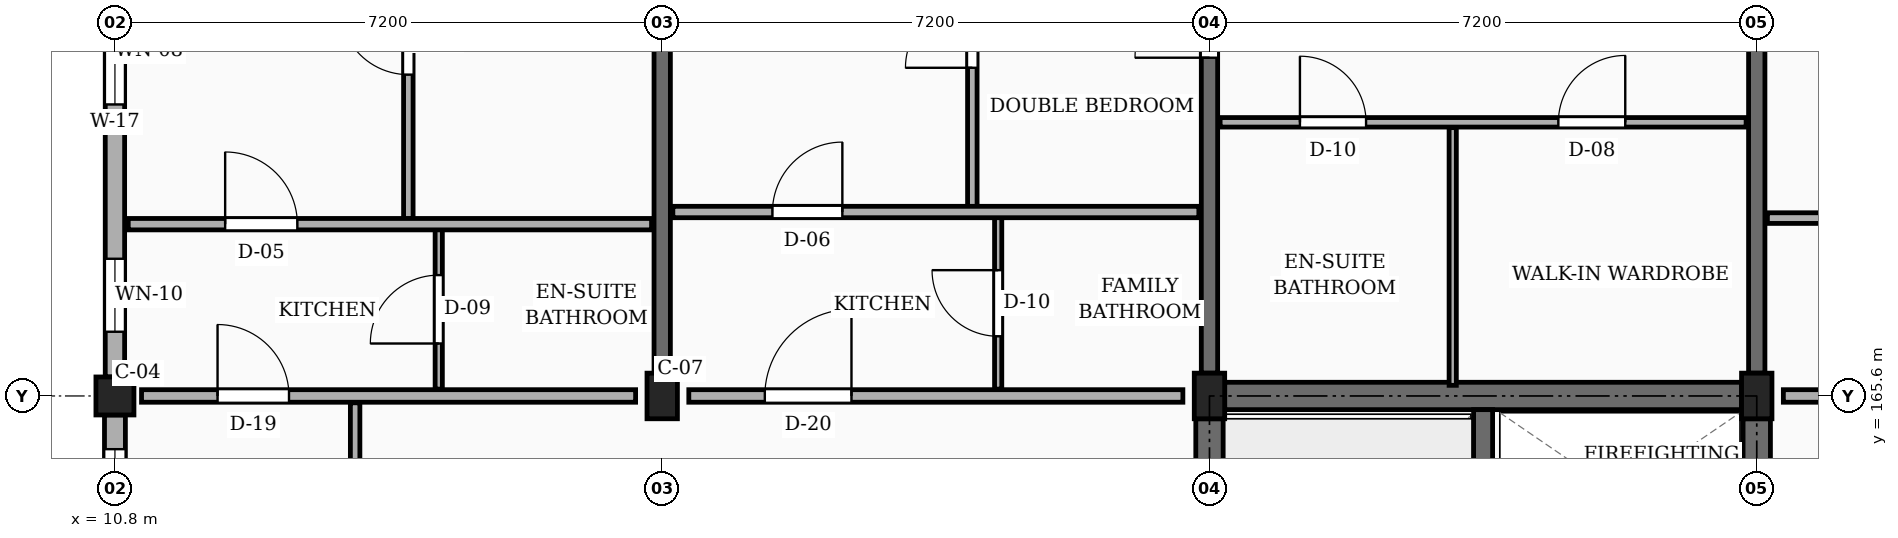
"""IFC4 building model, lengths in metres.
Left out: names, types, materials, properties, quantities, classifications, styles, units other than length and angle.
Written with IfcOpenShell. Run it as: python <this file> out.ifc"""

import sys

from ifc_helpers import new_model, si_unit, direction, frame, frame_2d, origin, origin_2d, place, context, subcontext, project, spatial, rectangle, extrude, element, fill, save


model = new_model("IFC4")
c1 = context("Model", 3, precision=1e-05, world=origin(), true_north=direction((0.0, 1.0)))
c2 = subcontext(c1, "Body", "Model", "MODEL_VIEW")
j1 = project(units=[si_unit("LENGTHUNIT", "METRE"), si_unit("PLANEANGLEUNIT", "RADIAN")], contexts=[c1])
p1 = place(None, origin())
s1 = spatial("IfcSite", under=j1, at=p1, CompositionType="ELEMENT")
p2 = place(p1, origin())
s2 = spatial("IfcBuilding", under=s1, at=p2, CompositionType="ELEMENT")
p3 = place(p2, frame((0.0, 0.0, 29.7)))
s3 = spatial("IfcBuildingStorey", under=s2, at=p3, CompositionType="ELEMENT", Elevation=29.7)
p4 = place(p3, frame((10.8, 165.6, 0.0), z_axis=(0.0, 0.0, 1.0), x_axis=(1.0, 0.0, 0.0)))
e1 = element("IfcColumn", 1, at=p4, inside=s3, PredefinedType="COLUMN", context=c2, shape_type="SweptSolid", body=[
    extrude(rectangle(XDim=0.5, YDim=0.5, at=origin_2d()), origin(), (0.0, 0.0, 1.0), 3.15),
])
for number, where, z_axis, x_axis in (
    (2, (18.0, 165.6, 0.0), (0.0, 0.0, 1.0), (1.0, 0.0, 0.0)),
    (3, (25.2, 165.6, 0.0), (0.0, 0.0, 1.0), (1.0, 0.0, 0.0)),
    (4, (32.4, 165.6, 0.0), (0.0, 0.0, 1.0), (1.0, 0.0, 0.0)),
):
    element("IfcColumn", number, at=place(p3, frame(where, z_axis=z_axis, x_axis=x_axis)), inside=s3, PredefinedType="COLUMN", context=c2, shape_type="SweptSolid", body=[
        extrude(rectangle(XDim=0.4, YDim=0.6, at=origin_2d()), origin(), (0.0, 0.0, 1.0), 3.15),
    ])
p5 = place(p3, frame((18.0, 165.9, 0.0), z_axis=(0.0, 0.0, 1.0), x_axis=(0.0, 1.0, 0.0)))
e5 = element("IfcWall", 5, at=p5, inside=s3, PredefinedType="SOLIDWALL", context=c2, shape_type="SweptSolid", body=[
    extrude(rectangle(XDim=6.65, YDim=0.215, at=frame_2d((3.325, 0.0))), origin(), (0.0, 0.0, 1.0), 2.185),
])
p6 = place(p3, frame((25.2, 165.9, 0.0), z_axis=(0.0, 0.0, 1.0), x_axis=(0.0, 1.0, 0.0)))
e6 = element("IfcWall", 6, at=p6, inside=s3, PredefinedType="SOLIDWALL", context=c2, shape_type="SweptSolid", body=[
    extrude(rectangle(XDim=6.65, YDim=0.215, at=frame_2d((3.325, 0.0))), origin(), (0.0, 0.0, 1.0), 2.185),
])
p7 = place(p6, frame((4.15, 0.0, 0.0)))
e7 = element("IfcOpeningElement", 7, at=p7, cuts=e6, PredefinedType="OPENING", context=c2, shape_type="SweptSolid", body=[
    extrude(rectangle(XDim=0.98, YDim=2.12, at=frame_2d((0.49, 1.06))), frame((0.0, 0.118, 0.0), z_axis=(0.0, -1.0, 0.0), x_axis=(1.0, 0.0, 0.0)), (0.0, 0.0, 1.0), 0.235),
])
p8 = place(p3, frame((32.4, 165.9, 0.0), z_axis=(0.0, 0.0, 1.0), x_axis=(0.0, 1.0, 0.0)))
e8 = element("IfcWall", 8, at=p8, inside=s3, PredefinedType="SOLIDWALL", context=c2, shape_type="SweptSolid", body=[
    extrude(rectangle(XDim=6.65, YDim=0.215, at=frame_2d((3.325, 0.0))), origin(), (0.0, 0.0, 1.0), 2.185),
])
p9 = place(p3, frame((10.8, 172.55, 0.0), z_axis=(0.0, 0.0, 1.0), x_axis=(0.0, -1.0, 0.0)))
e9 = element("IfcWall", 9, at=p9, inside=s3, PredefinedType="SOLIDWALL", context=c2, shape_type="SweptSolid", body=[
    extrude(rectangle(XDim=6.7, YDim=0.255, at=frame_2d((3.35, 0.0))), origin(), (0.0, 0.0, 1.0), 2.455),
])
p10 = place(p9, frame((1.715, 0.0, 0.78)))
e10 = element("IfcOpeningElement", 10, at=p10, cuts=e9, PredefinedType="OPENING", context=c2, shape_type="SweptSolid", body=[
    extrude(rectangle(XDim=1.4, YDim=1.15, at=frame_2d((0.7, 0.575))), frame((0.0, 0.137, 0.0), z_axis=(0.0, -1.0, 0.0), x_axis=(1.0, 0.0, 0.0)), (0.0, 0.0, 1.0), 0.275),
])
p11 = place(p9, frame((5.145, 0.0, 0.78)))
e11 = element("IfcOpeningElement", 11, at=p11, cuts=e9, PredefinedType="OPENING", context=c2, shape_type="SweptSolid", body=[
    extrude(rectangle(XDim=0.96, YDim=1.26, at=frame_2d((0.48, 0.63))), frame((0.0, 0.137, 0.0), z_axis=(0.0, -1.0, 0.0), x_axis=(1.0, 0.0, 0.0)), (0.0, 0.0, 1.0), 0.275),
])
p12 = place(p3, frame((10.8, 165.35, 0.0), z_axis=(0.0, 0.0, 1.0), x_axis=(0.0, -1.0, 0.0)))
e12 = element("IfcWall", 12, at=p12, inside=s3, PredefinedType="SOLIDWALL", context=c2, shape_type="SweptSolid", body=[
    extrude(rectangle(XDim=6.7, YDim=0.275, at=frame_2d((3.35, 0.0))), origin(), (0.0, 0.0, 1.0), 2.455),
])
p13 = place(p12, frame((0.45, 0.0, 0.78)))
e13 = element("IfcOpeningElement", 13, at=p13, cuts=e12, PredefinedType="OPENING", context=c2, shape_type="SweptSolid", body=[
    extrude(rectangle(XDim=0.96, YDim=1.26, at=frame_2d((0.48, 0.63))), frame((0.0, 0.147, 0.0), z_axis=(0.0, -1.0, 0.0), x_axis=(1.0, 0.0, 0.0)), (0.0, 0.0, 1.0), 0.295),
])
p14 = place(p12, frame((4.65, 0.0, 0.78)))
e14 = element("IfcOpeningElement", 14, at=p14, cuts=e12, PredefinedType="OPENING", context=c2, shape_type="SweptSolid", body=[
    extrude(rectangle(XDim=1.12, YDim=1.26, at=frame_2d((0.56, 0.63))), frame((0.0, 0.147, 0.0), z_axis=(0.0, -1.0, 0.0), x_axis=(1.0, 0.0, 0.0)), (0.0, 0.0, 1.0), 0.295),
])
p15 = place(p3, frame((25.2, 158.7, 0.0), z_axis=(0.0, 0.0, 1.0), x_axis=(0.0, 1.0, 0.0)))
e15 = element("IfcWall", 15, at=p15, inside=s3, PredefinedType="SHEAR", context=c2, shape_type="SweptSolid", body=[
    extrude(rectangle(XDim=6.6, YDim=0.36, at=frame_2d((3.3, 0.0))), origin(), (0.0, 0.0, 1.0), 2.885),
])
p16 = place(p3, frame((25.4, 165.6, 0.0), z_axis=(0.0, 0.0, 1.0), x_axis=(1.0, 0.0, 0.0)))
e16 = element("IfcWall", 16, at=p16, inside=s3, PredefinedType="SHEAR", context=c2, shape_type="SweptSolid", body=[
    extrude(rectangle(XDim=6.8, YDim=0.36, at=frame_2d((3.4, 0.0))), origin(), (0.0, 0.0, 1.0), 2.885),
])
p17 = place(p3, frame((32.4, 158.7, 0.0), z_axis=(0.0, 0.0, 1.0), x_axis=(0.0, 1.0, 0.0)))
e17 = element("IfcWall", 17, at=p17, inside=s3, PredefinedType="SHEAR", context=c2, shape_type="SweptSolid", body=[
    extrude(rectangle(XDim=6.6, YDim=0.36, at=frame_2d((3.3, 0.0))), origin(), (0.0, 0.0, 1.0), 2.885),
])
p18 = place(p3, frame((28.8, 158.58, 0.0), z_axis=(0.0, 0.0, 1.0), x_axis=(0.0, 1.0, 0.0)))
e18 = element("IfcWall", 18, at=p18, inside=s3, PredefinedType="SHEAR", context=c2, shape_type="SweptSolid", body=[
    extrude(rectangle(XDim=6.84, YDim=0.25, at=frame_2d((3.42, 0.0))), origin(), (0.0, 0.0, 1.0), 2.885),
])
p19 = place(p18, frame((0.42, 0.0, 0.0)))
e19 = element("IfcOpeningElement", 19, at=p19, cuts=e18, PredefinedType="OPENING", context=c2, shape_type="SweptSolid", body=[
    extrude(rectangle(XDim=1.05, YDim=2.15, at=frame_2d((0.525, 1.075))), frame((0.0, 0.135, 0.0), z_axis=(0.0, -1.0, 0.0), x_axis=(1.0, 0.0, 0.0)), (0.0, 0.0, 1.0), 0.27),
])
p20 = place(p3, frame((11.15, 165.6, 0.0), z_axis=(0.0, 0.0, 1.0), x_axis=(1.0, 0.0, 0.0)))
e20 = element("IfcWall", 20, at=p20, inside=s3, PredefinedType="PARTITIONING", context=c2, shape_type="SweptSolid", body=[
    extrude(rectangle(XDim=6.5, YDim=0.165, at=frame_2d((3.25, 0.0))), origin(), (0.0, 0.0, 1.0), 2.32),
])
p21 = place(p20, frame((1.0, 0.0, 0.0)))
e21 = element("IfcOpeningElement", 21, at=p21, cuts=e20, PredefinedType="OPENING", context=c2, shape_type="SweptSolid", body=[
    extrude(rectangle(XDim=0.94, YDim=2.12, at=frame_2d((0.47, 1.06))), frame((0.0, 0.093, 0.0), z_axis=(0.0, -1.0, 0.0), x_axis=(1.0, 0.0, 0.0)), (0.0, 0.0, 1.0), 0.185),
])
p22 = place(p3, frame((18.35, 165.6, 0.0), z_axis=(0.0, 0.0, 1.0), x_axis=(1.0, 0.0, 0.0)))
e22 = element("IfcWall", 22, at=p22, inside=s3, PredefinedType="PARTITIONING", context=c2, shape_type="SweptSolid", body=[
    extrude(rectangle(XDim=6.5, YDim=0.165, at=frame_2d((3.25, 0.0))), origin(), (0.0, 0.0, 1.0), 2.32),
])
p23 = place(p22, frame((1.0, 0.0, 0.0)))
e23 = element("IfcOpeningElement", 23, at=p23, cuts=e22, PredefinedType="OPENING", context=c2, shape_type="SweptSolid", body=[
    extrude(rectangle(XDim=1.14, YDim=2.18, at=frame_2d((0.57, 1.09))), frame((0.0, 0.093, 0.0), z_axis=(0.0, -1.0, 0.0), x_axis=(1.0, 0.0, 0.0)), (0.0, 0.0, 1.0), 0.185),
])
p24 = place(p3, frame((32.75, 165.6, 0.0), z_axis=(0.0, 0.0, 1.0), x_axis=(1.0, 0.0, 0.0)))
e24 = element("IfcWall", 24, at=p24, inside=s3, PredefinedType="PARTITIONING", context=c2, shape_type="SweptSolid", body=[
    extrude(rectangle(XDim=6.5, YDim=0.165, at=frame_2d((3.25, 0.0))), origin(), (0.0, 0.0, 1.0), 2.32),
])
p25 = place(p24, frame((1.0, 0.0, 0.0)))
e25 = element("IfcOpeningElement", 25, at=p25, cuts=e24, PredefinedType="OPENING", context=c2, shape_type="SweptSolid", body=[
    extrude(rectangle(XDim=1.0, YDim=2.15, at=frame_2d((0.5, 1.075))), frame((0.0, 0.093, 0.0), z_axis=(0.0, -1.0, 0.0), x_axis=(1.0, 0.0, 0.0)), (0.0, 0.0, 1.0), 0.185),
])
p26 = place(p3, frame((13.96, 158.49, 0.0), z_axis=(0.0, 0.0, 1.0), x_axis=(0.0, 1.0, 0.0)))
e26 = element("IfcWall", 26, at=p26, inside=s3, PredefinedType="PARTITIONING", context=c2, shape_type="SweptSolid", body=[
    extrude(rectangle(XDim=7.02, YDim=0.125, at=frame_2d((3.51, 0.0))), origin(), (0.0, 0.0, 1.0), 2.32),
])
p27 = place(p26, frame((2.85, 0.0, 0.0)))
e27 = element("IfcOpeningElement", 27, at=p27, cuts=e26, PredefinedType="OPENING", context=c2, shape_type="SweptSolid", body=[
    extrude(rectangle(XDim=1.02, YDim=2.15, at=frame_2d((0.51, 1.075))), frame((0.0, 0.073, 0.0), z_axis=(0.0, -1.0, 0.0), x_axis=(1.0, 0.0, 0.0)), (0.0, 0.0, 1.0), 0.145),
])
p28 = place(p3, frame((14.66, 167.93, 0.0), z_axis=(0.0, 0.0, 1.0), x_axis=(0.0, 1.0, 0.0)))
e28 = element("IfcWall", 28, at=p28, inside=s3, PredefinedType="PARTITIONING", context=c2, shape_type="SweptSolid", body=[
    extrude(rectangle(XDim=4.695, YDim=0.125, at=frame_2d((2.348, 0.0))), origin(), (0.0, 0.0, 1.0), 2.32),
])
p29 = place(p28, frame((1.897, 0.0, 0.0)))
e29 = element("IfcOpeningElement", 29, at=p29, cuts=e28, PredefinedType="OPENING", context=c2, shape_type="SweptSolid", body=[
    extrude(rectangle(XDim=0.9, YDim=2.1, at=frame_2d((0.45, 1.05))), frame((0.0, 0.073, 0.0), z_axis=(0.0, -1.0, 0.0), x_axis=(1.0, 0.0, 0.0)), (0.0, 0.0, 1.0), 0.145),
])
p30 = place(p3, frame((15.06, 165.69, 0.0), z_axis=(0.0, 0.0, 1.0), x_axis=(0.0, 1.0, 0.0)))
e30 = element("IfcWall", 30, at=p30, inside=s3, PredefinedType="PARTITIONING", context=c2, shape_type="SweptSolid", body=[
    extrude(rectangle(XDim=2.1, YDim=0.095, at=frame_2d((1.05, 0.0))), origin(), (0.0, 0.0, 1.0), 2.32),
])
p31 = place(p30, frame((0.6, 0.0, 0.0)))
e31 = element("IfcOpeningElement", 31, at=p31, cuts=e30, PredefinedType="OPENING", context=c2, shape_type="SweptSolid", body=[
    extrude(rectangle(XDim=0.9, YDim=2.05, at=frame_2d((0.45, 1.025))), frame((0.0, 0.058, 0.0), z_axis=(0.0, -1.0, 0.0), x_axis=(1.0, 0.0, 0.0)), (0.0, 0.0, 1.0), 0.115),
])
p32 = place(p3, frame((10.975, 167.86, 0.0), z_axis=(0.0, 0.0, 1.0), x_axis=(1.0, 0.0, 0.0)))
e32 = element("IfcWall", 32, at=p32, inside=s3, PredefinedType="PARTITIONING", context=c2, shape_type="SweptSolid", body=[
    extrude(rectangle(XDim=6.885, YDim=0.15, at=frame_2d((3.442, 0.0))), origin(), (0.0, 0.0, 1.0), 2.32),
])
p33 = place(p32, frame((1.275, 0.0, 0.0)))
e33 = element("IfcOpeningElement", 33, at=p33, cuts=e32, PredefinedType="OPENING", context=c2, shape_type="SweptSolid", body=[
    extrude(rectangle(XDim=0.95, YDim=2.1, at=frame_2d((0.475, 1.05))), frame((0.0, 0.085, 0.0), z_axis=(0.0, -1.0, 0.0), x_axis=(1.0, 0.0, 0.0)), (0.0, 0.0, 1.0), 0.17),
])
p34 = place(p3, frame((22.08, 168.09, 0.0), z_axis=(0.0, 0.0, 1.0), x_axis=(0.0, 1.0, 0.0)))
e34 = element("IfcWall", 34, at=p34, inside=s3, PredefinedType="PARTITIONING", context=c2, shape_type="SweptSolid", body=[
    extrude(rectangle(XDim=4.535, YDim=0.125, at=frame_2d((2.268, 0.0))), origin(), (0.0, 0.0, 1.0), 2.32),
])
p35 = place(p34, frame((1.827, 0.0, 0.0)))
e35 = element("IfcOpeningElement", 35, at=p35, cuts=e34, PredefinedType="OPENING", context=c2, shape_type="SweptSolid", body=[
    extrude(rectangle(XDim=0.88, YDim=2.08, at=frame_2d((0.44, 1.04))), frame((0.0, 0.073, 0.0), z_axis=(0.0, -1.0, 0.0), x_axis=(1.0, 0.0, 0.0)), (0.0, 0.0, 1.0), 0.145),
])
p36 = place(p3, frame((22.42, 165.69, 0.0), z_axis=(0.0, 0.0, 1.0), x_axis=(0.0, 1.0, 0.0)))
e36 = element("IfcWall", 36, at=p36, inside=s3, PredefinedType="PARTITIONING", context=c2, shape_type="SweptSolid", body=[
    extrude(rectangle(XDim=2.26, YDim=0.095, at=frame_2d((1.13, 0.0))), origin(), (0.0, 0.0, 1.0), 2.32),
])
p37 = place(p36, frame((0.695, 0.0, 0.0)))
e37 = element("IfcOpeningElement", 37, at=p37, cuts=e36, PredefinedType="OPENING", context=c2, shape_type="SweptSolid", body=[
    extrude(rectangle(XDim=0.87, YDim=2.05, at=frame_2d((0.435, 1.025))), frame((0.0, 0.058, 0.0), z_axis=(0.0, -1.0, 0.0), x_axis=(1.0, 0.0, 0.0)), (0.0, 0.0, 1.0), 0.115),
])
p38 = place(p3, frame((18.14, 168.02, 0.0), z_axis=(0.0, 0.0, 1.0), x_axis=(1.0, 0.0, 0.0)))
e38 = element("IfcWall", 38, at=p38, inside=s3, PredefinedType="PARTITIONING", context=c2, shape_type="SweptSolid", body=[
    extrude(rectangle(XDim=6.92, YDim=0.15, at=frame_2d((3.46, 0.0))), origin(), (0.0, 0.0, 1.0), 2.32),
])
p39 = place(p38, frame((1.31, 0.0, 0.0)))
e39 = element("IfcOpeningElement", 39, at=p39, cuts=e38, PredefinedType="OPENING", context=c2, shape_type="SweptSolid", body=[
    extrude(rectangle(XDim=0.92, YDim=2.1, at=frame_2d((0.46, 1.05))), frame((0.0, 0.085, 0.0), z_axis=(0.0, -1.0, 0.0), x_axis=(1.0, 0.0, 0.0)), (0.0, 0.0, 1.0), 0.17),
])
p40 = place(p3, frame((25.34, 169.2, 0.0), z_axis=(0.0, 0.0, 1.0), x_axis=(1.0, 0.0, 0.0)))
e40 = element("IfcWall", 40, at=p40, inside=s3, PredefinedType="PARTITIONING", context=c2, shape_type="SweptSolid", body=[
    extrude(rectangle(XDim=6.92, YDim=0.125, at=frame_2d((3.46, 0.0))), origin(), (0.0, 0.0, 1.0), 2.32),
])
p41 = place(p40, frame((1.05, 0.0, 0.0)))
e41 = element("IfcOpeningElement", 41, at=p41, cuts=e40, PredefinedType="OPENING", context=c2, shape_type="SweptSolid", body=[
    extrude(rectangle(XDim=0.87, YDim=2.05, at=frame_2d((0.435, 1.025))), frame((0.0, 0.073, 0.0), z_axis=(0.0, -1.0, 0.0), x_axis=(1.0, 0.0, 0.0)), (0.0, 0.0, 1.0), 0.145),
])
p42 = place(p40, frame((4.45, 0.0, 0.0)))
e42 = element("IfcOpeningElement", 42, at=p42, cuts=e40, PredefinedType="OPENING", context=c2, shape_type="SweptSolid", body=[
    extrude(rectangle(XDim=0.88, YDim=2.08, at=frame_2d((0.44, 1.04))), frame((0.0, 0.073, 0.0), z_axis=(0.0, -1.0, 0.0), x_axis=(1.0, 0.0, 0.0)), (0.0, 0.0, 1.0), 0.145),
])
p43 = place(p3, frame((28.4, 165.74, 0.0), z_axis=(0.0, 0.0, 1.0), x_axis=(0.0, 1.0, 0.0)))
e43 = element("IfcWall", 43, at=p43, inside=s3, PredefinedType="PARTITIONING", context=c2, shape_type="SweptSolid", body=[
    extrude(rectangle(XDim=3.39, YDim=0.095, at=frame_2d((1.695, 0.0))), origin(), (0.0, 0.0, 1.0), 2.32),
])
p44 = place(p3, frame((32.54, 167.94, 0.0), z_axis=(0.0, 0.0, 1.0), x_axis=(1.0, 0.0, 0.0)))
e44 = element("IfcWall", 44, at=p44, inside=s3, PredefinedType="PARTITIONING", context=c2, shape_type="SweptSolid", body=[
    extrude(rectangle(XDim=6.92, YDim=0.14, at=frame_2d((3.46, 0.0))), origin(), (0.0, 0.0, 1.0), 2.32),
])
p45 = place(p44, frame((1.31, 0.0, 0.0)))
e45 = element("IfcOpeningElement", 45, at=p45, cuts=e44, PredefinedType="OPENING", context=c2, shape_type="SweptSolid", body=[
    extrude(rectangle(XDim=0.92, YDim=2.1, at=frame_2d((0.46, 1.05))), frame((0.0, 0.08, 0.0), z_axis=(0.0, -1.0, 0.0), x_axis=(1.0, 0.0, 0.0)), (0.0, 0.0, 1.0), 0.16),
])
p46 = place(p10, origin())
e46 = element("IfcWindow", 46, at=p46, inside=s3, PartitioningType="SINGLE_PANEL", PredefinedType="WINDOW", context=c2, shape_type="SweptSolid", body=[
    extrude(rectangle(XDim=1.4, YDim=1.15, at=frame_2d((0.7, 0.575))), frame((0.0, 0.03, 0.0), z_axis=(0.0, -1.0, 0.0), x_axis=(1.0, 0.0, 0.0)), (0.0, 0.0, 1.0), 0.06),
])
fill(e10, e46)
p47 = place(p11, origin())
e47 = element("IfcWindow", 47, at=p47, inside=s3, PartitioningType="SINGLE_PANEL", PredefinedType="WINDOW", context=c2, shape_type="SweptSolid", body=[
    extrude(rectangle(XDim=0.96, YDim=1.26, at=frame_2d((0.48, 0.63))), frame((0.0, 0.03, 0.0), z_axis=(0.0, -1.0, 0.0), x_axis=(1.0, 0.0, 0.0)), (0.0, 0.0, 1.0), 0.06),
])
fill(e11, e47)
p48 = place(p13, origin())
e48 = element("IfcWindow", 48, at=p48, inside=s3, PartitioningType="SINGLE_PANEL", PredefinedType="WINDOW", context=c2, shape_type="SweptSolid", body=[
    extrude(rectangle(XDim=0.96, YDim=1.26, at=frame_2d((0.48, 0.63))), frame((0.0, 0.03, 0.0), z_axis=(0.0, -1.0, 0.0), x_axis=(1.0, 0.0, 0.0)), (0.0, 0.0, 1.0), 0.06),
])
fill(e13, e48)
p49 = place(p21, origin())
e49 = element("IfcDoor", 49, at=p49, inside=s3, OperationType="SINGLE_SWING_LEFT", PredefinedType="DOOR", context=c2, shape_type="SweptSolid", body=[
    extrude(rectangle(XDim=0.94, YDim=2.12, at=frame_2d((0.47, 1.06))), frame((0.0, 0.025, 0.0), z_axis=(0.0, -1.0, 0.0), x_axis=(1.0, 0.0, 0.0)), (0.0, 0.0, 1.0), 0.05),
])
fill(e21, e49)
p50 = place(p23, origin())
e50 = element("IfcDoor", 50, at=p50, inside=s3, OperationType="SINGLE_SWING_RIGHT", PredefinedType="DOOR", context=c2, shape_type="SweptSolid", body=[
    extrude(rectangle(XDim=1.14, YDim=2.18, at=frame_2d((0.57, 1.09))), frame((0.0, 0.025, 0.0), z_axis=(0.0, -1.0, 0.0), x_axis=(1.0, 0.0, 0.0)), (0.0, 0.0, 1.0), 0.05),
])
fill(e23, e50)
p51 = place(p29, origin())
e51 = element("IfcDoor", 51, at=p51, inside=s3, OperationType="SINGLE_SWING_RIGHT", PredefinedType="DOOR", context=c2, shape_type="SweptSolid", body=[
    extrude(rectangle(XDim=0.9, YDim=2.1, at=frame_2d((0.45, 1.05))), frame((0.0, 0.025, 0.0), z_axis=(0.0, -1.0, 0.0), x_axis=(1.0, 0.0, 0.0)), (0.0, 0.0, 1.0), 0.05),
])
fill(e29, e51)
p52 = place(p31, origin())
e52 = element("IfcDoor", 52, at=p52, inside=s3, OperationType="SINGLE_SWING_LEFT", PredefinedType="DOOR", context=c2, shape_type="SweptSolid", body=[
    extrude(rectangle(XDim=0.9, YDim=2.05, at=frame_2d((0.45, 1.025))), frame((0.0, 0.025, 0.0), z_axis=(0.0, -1.0, 0.0), x_axis=(1.0, 0.0, 0.0)), (0.0, 0.0, 1.0), 0.05),
])
fill(e31, e52)
p53 = place(p33, origin())
e53 = element("IfcDoor", 53, at=p53, inside=s3, OperationType="SINGLE_SWING_LEFT", PredefinedType="DOOR", context=c2, shape_type="SweptSolid", body=[
    extrude(rectangle(XDim=0.95, YDim=2.1, at=frame_2d((0.475, 1.05))), frame((0.0, 0.025, 0.0), z_axis=(0.0, -1.0, 0.0), x_axis=(1.0, 0.0, 0.0)), (0.0, 0.0, 1.0), 0.05),
])
fill(e33, e53)
p54 = place(p35, origin())
e54 = element("IfcDoor", 54, at=p54, inside=s3, OperationType="SINGLE_SWING_LEFT", PredefinedType="DOOR", context=c2, shape_type="SweptSolid", body=[
    extrude(rectangle(XDim=0.88, YDim=2.08, at=frame_2d((0.44, 1.04))), frame((0.0, 0.025, 0.0), z_axis=(0.0, -1.0, 0.0), x_axis=(1.0, 0.0, 0.0)), (0.0, 0.0, 1.0), 0.05),
])
fill(e35, e54)
p55 = place(p37, origin())
e55 = element("IfcDoor", 55, at=p55, inside=s3, OperationType="SINGLE_SWING_RIGHT", PredefinedType="DOOR", context=c2, shape_type="SweptSolid", body=[
    extrude(rectangle(XDim=0.87, YDim=2.05, at=frame_2d((0.435, 1.025))), frame((0.0, 0.025, 0.0), z_axis=(0.0, -1.0, 0.0), x_axis=(1.0, 0.0, 0.0)), (0.0, 0.0, 1.0), 0.05),
])
fill(e37, e55)
p56 = place(p39, origin())
e56 = element("IfcDoor", 56, at=p56, inside=s3, OperationType="SINGLE_SWING_RIGHT", PredefinedType="DOOR", context=c2, shape_type="SweptSolid", body=[
    extrude(rectangle(XDim=0.92, YDim=2.1, at=frame_2d((0.46, 1.05))), frame((0.0, 0.025, 0.0), z_axis=(0.0, -1.0, 0.0), x_axis=(1.0, 0.0, 0.0)), (0.0, 0.0, 1.0), 0.05),
])
fill(e39, e56)
p57 = place(p41, origin())
e57 = element("IfcDoor", 57, at=p57, inside=s3, OperationType="SINGLE_SWING_LEFT", PredefinedType="DOOR", context=c2, shape_type="SweptSolid", body=[
    extrude(rectangle(XDim=0.87, YDim=2.05, at=frame_2d((0.435, 1.025))), frame((0.0, 0.025, 0.0), z_axis=(0.0, -1.0, 0.0), x_axis=(1.0, 0.0, 0.0)), (0.0, 0.0, 1.0), 0.05),
])
fill(e41, e57)
p58 = place(p42, origin())
e58 = element("IfcDoor", 58, at=p58, inside=s3, OperationType="SINGLE_SWING_RIGHT", PredefinedType="DOOR", context=c2, shape_type="SweptSolid", body=[
    extrude(rectangle(XDim=0.88, YDim=2.08, at=frame_2d((0.44, 1.04))), frame((0.0, 0.025, 0.0), z_axis=(0.0, -1.0, 0.0), x_axis=(1.0, 0.0, 0.0)), (0.0, 0.0, 1.0), 0.05),
])
fill(e42, e58)
p59 = place(p7, origin())
e59 = element("IfcDoor", 59, at=p59, inside=s3, OperationType="SINGLE_SWING_LEFT", PredefinedType="DOOR", context=c2, shape_type="SweptSolid", body=[
    extrude(rectangle(XDim=0.98, YDim=2.12, at=frame_2d((0.49, 1.06))), frame((0.0, 0.025, 0.0), z_axis=(0.0, -1.0, 0.0), x_axis=(1.0, 0.0, 0.0)), (0.0, 0.0, 1.0), 0.05),
])
fill(e7, e59)
save(model, sys.argv[1])
